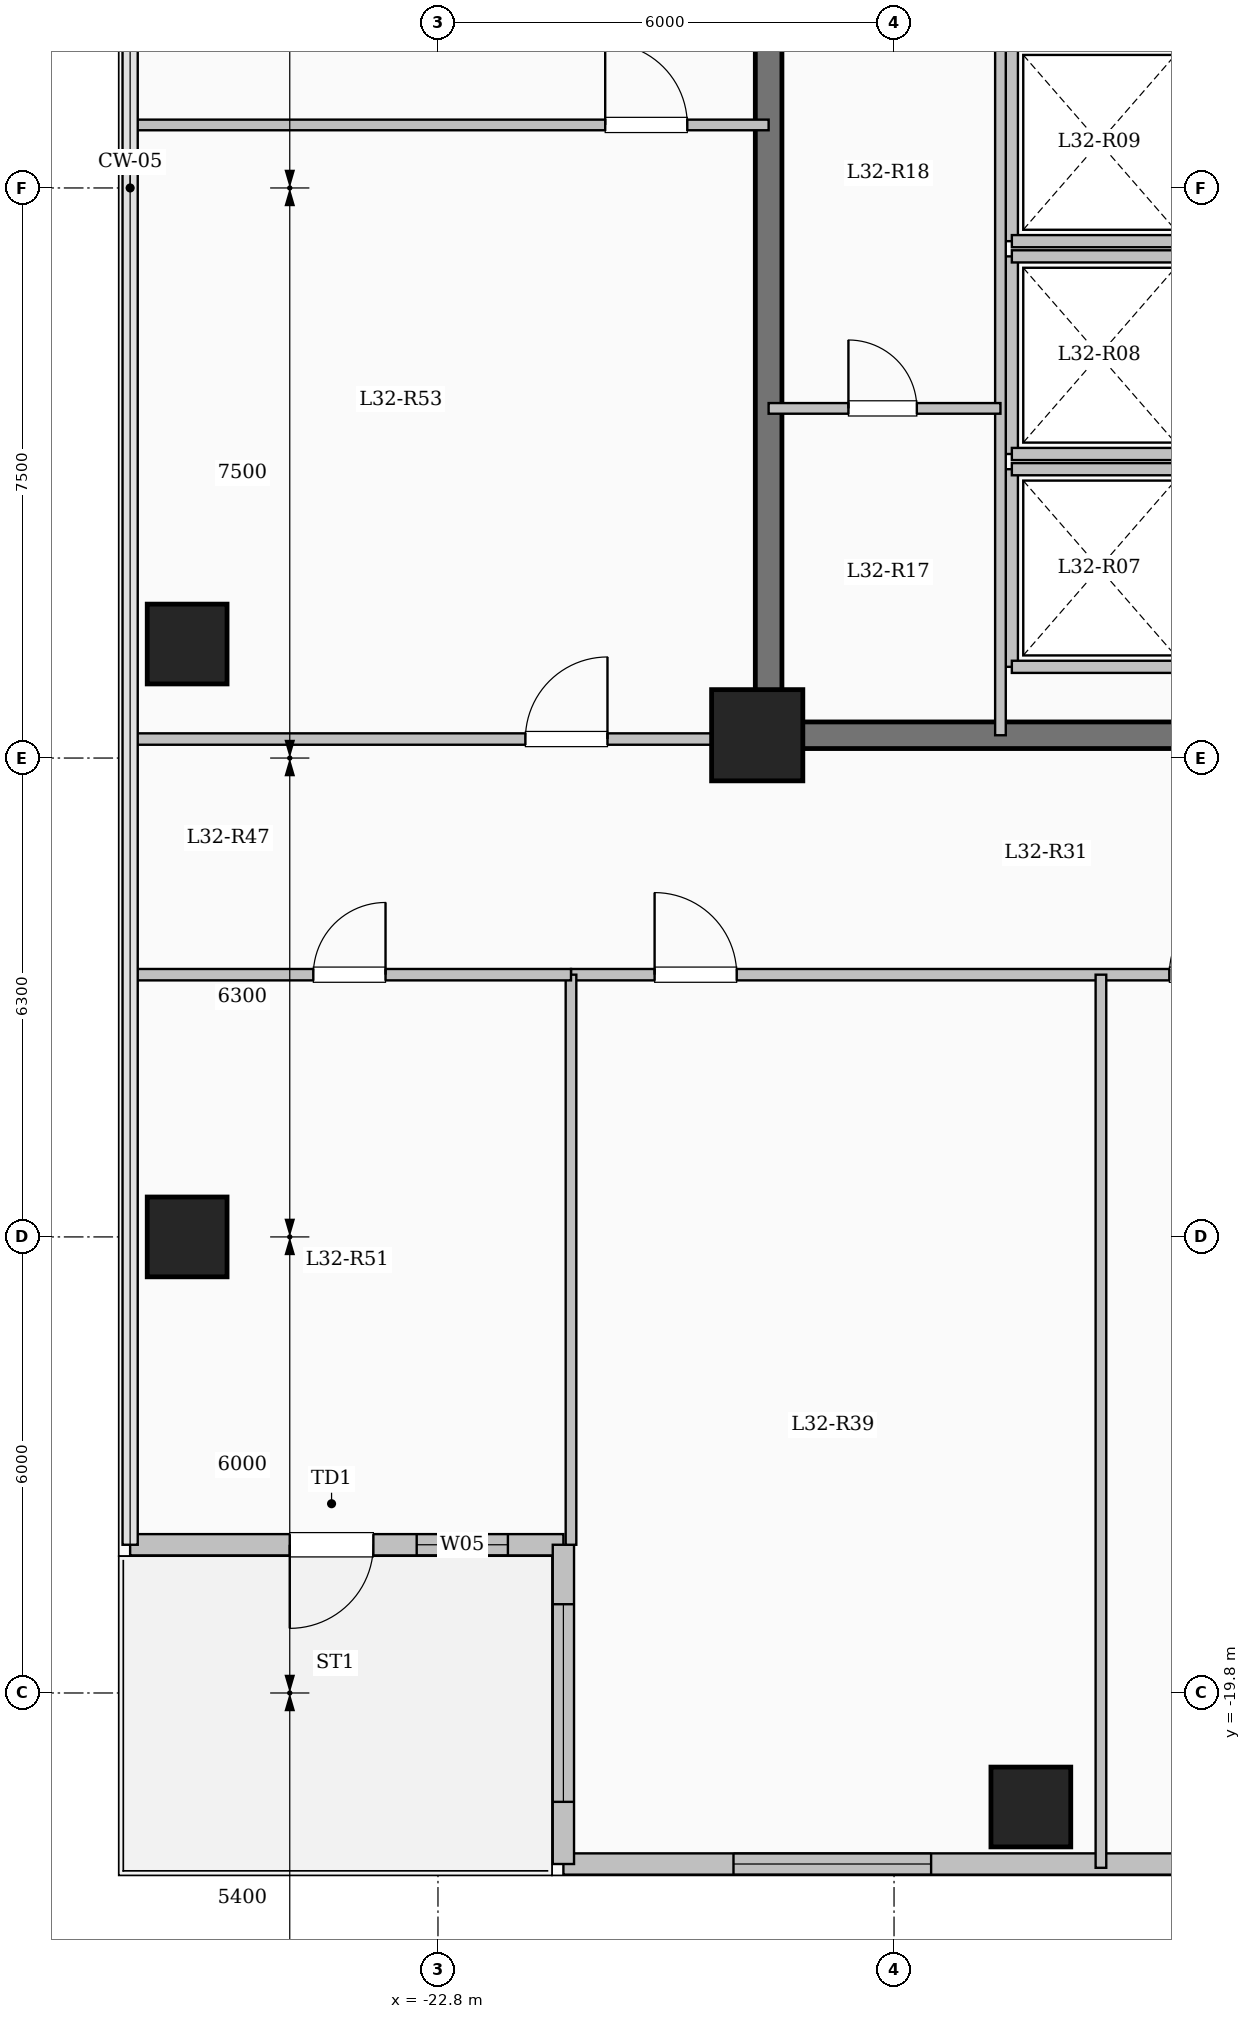
"""IFC4 building model, lengths in metres.
Left out: names, types, materials, properties, quantities, classifications, styles, units other than length and angle.
Written with IfcOpenShell. Run it as: python <this file> out.ifc"""

import sys

from ifc_helpers import new_model, si_unit, direction, frame, frame_2d, origin, origin_2d, place, context, subcontext, project, spatial, rectangle, extrude, element, fill, save


model = new_model("IFC4")
c1 = context("Model", 3, precision=1e-05, world=origin(), true_north=direction((0.0, 1.0)))
c2 = subcontext(c1, "Body", "Model", "MODEL_VIEW")
j1 = project(units=[si_unit("LENGTHUNIT", "METRE"), si_unit("PLANEANGLEUNIT", "RADIAN")], contexts=[c1])
p1 = place(None, origin())
s1 = spatial("IfcSite", under=j1, at=p1, CompositionType="ELEMENT")
p2 = place(p1, origin())
s2 = spatial("IfcBuilding", under=s1, at=p2, CompositionType="ELEMENT")
p3 = place(p2, frame((0.0, 0.0, 118.5)))
s3 = spatial("IfcBuildingStorey", under=s2, at=p3, CompositionType="ELEMENT", Elevation=118.5)
p4 = place(p3, frame((-18.6, -7.2, 0.0), z_axis=(0.0, 0.0, 1.0), x_axis=(1.0, 0.0, 0.0)))
e1 = element("IfcColumn", 1, at=p4, inside=s3, PredefinedType="COLUMN", context=c2, shape_type="SweptSolid", body=[
    extrude(rectangle(XDim=1.2, YDim=1.2, at=origin_2d()), origin(), (0.0, 0.0, 1.0), 4.5),
])
for number, where, z_axis, x_axis in (
    (2, (-15.0, -21.3, 0.0), (0.0, 0.0, 1.0), (1.0, 0.0, 0.0)),
    (3, (-26.1, -13.8, 0.0), (0.0, 0.0, 1.0), (1.0, 0.0, 0.0)),
    (4, (-26.1, -6.0, 0.0), (0.0, 0.0, 1.0), (1.0, 0.0, 0.0)),
):
    element("IfcColumn", number, at=place(p3, frame(where, z_axis=z_axis, x_axis=x_axis)), inside=s3, PredefinedType="COLUMN", context=c2, shape_type="SweptSolid", body=[
        extrude(rectangle(XDim=1.05, YDim=1.05, at=origin_2d()), origin(), (0.0, 0.0, 1.0), 4.5),
    ])
p5 = place(p3, frame((-21.15, -17.85, 0.0), z_axis=(0.0, 0.0, 1.0), x_axis=(-1.0, 0.0, 0.0)))
e5 = element("IfcWall", 5, at=p5, inside=s3, PredefinedType="SOLIDWALL", context=c2, shape_type="SweptSolid", body=[
    extrude(rectangle(XDim=5.7, YDim=0.28, at=frame_2d((2.85, 0.0))), origin(), (0.0, 0.0, 1.0), 4.2),
])
p6 = place(p5, frame((2.5, 0.0, 0.0)))
e6 = element("IfcOpeningElement", 6, at=p6, cuts=e5, PredefinedType="OPENING", context=c2, shape_type="SweptSolid", body=[
    extrude(rectangle(XDim=1.1, YDim=2.2, at=frame_2d((0.55, 1.1))), frame((0.0, 0.15, 0.0), z_axis=(0.0, -1.0, 0.0), x_axis=(1.0, 0.0, 0.0)), (0.0, 0.0, 1.0), 0.3),
])
p7 = place(p5, frame((0.73, 0.0, 0.95)))
e7 = element("IfcOpeningElement", 7, at=p7, cuts=e5, PredefinedType="OPENING", context=c2, shape_type="SweptSolid", body=[
    extrude(rectangle(XDim=1.2, YDim=1.5, at=frame_2d((0.6, 0.75))), frame((0.0, 0.15, 0.0), z_axis=(0.0, -1.0, 0.0), x_axis=(1.0, 0.0, 0.0)), (0.0, 0.0, 1.0), 0.3),
])
p8 = place(p3, frame((-7.35, -22.05, 0.0), z_axis=(0.0, 0.0, 1.0), x_axis=(-1.0, 0.0, 0.0)))
e8 = element("IfcWall", 8, at=p8, inside=s3, PredefinedType="SOLIDWALL", context=c2, shape_type="SweptSolid", body=[
    extrude(rectangle(XDim=13.8, YDim=0.28, at=frame_2d((6.9, 0.0))), origin(), (0.0, 0.0, 1.0), 4.2),
])
p9 = place(p8, frame((0.147, 0.0, 0.95)))
e9 = element("IfcOpeningElement", 9, at=p9, cuts=e8, PredefinedType="OPENING", context=c2, shape_type="SweptSolid", body=[
    extrude(rectangle(XDim=0.85, YDim=1.5, at=frame_2d((0.425, 0.75))), frame((0.0, 0.15, 0.0), z_axis=(0.0, -1.0, 0.0), x_axis=(1.0, 0.0, 0.0)), (0.0, 0.0, 1.0), 0.3),
])
p10 = place(p8, frame((2.664, 0.0, 0.85)))
e10 = element("IfcOpeningElement", 10, at=p10, cuts=e8, PredefinedType="OPENING", context=c2, shape_type="SweptSolid", body=[
    extrude(rectangle(XDim=2.6, YDim=2.4, at=frame_2d((1.3, 1.2))), frame((0.0, 0.15, 0.0), z_axis=(0.0, -1.0, 0.0), x_axis=(1.0, 0.0, 0.0)), (0.0, 0.0, 1.0), 0.3),
])
p11 = place(p8, frame((8.962, 0.0, 0.85)))
e11 = element("IfcOpeningElement", 11, at=p11, cuts=e8, PredefinedType="OPENING", context=c2, shape_type="SweptSolid", body=[
    extrude(rectangle(XDim=2.6, YDim=2.4, at=frame_2d((1.3, 1.2))), frame((0.0, 0.15, 0.0), z_axis=(0.0, -1.0, 0.0), x_axis=(1.0, 0.0, 0.0)), (0.0, 0.0, 1.0), 0.3),
])
p12 = place(p3, frame((-21.15, -22.05, 0.0), z_axis=(0.0, 0.0, 1.0), x_axis=(0.0, 1.0, 0.0)))
e12 = element("IfcWall", 12, at=p12, inside=s3, PredefinedType="SOLIDWALL", context=c2, shape_type="SweptSolid", body=[
    extrude(rectangle(XDim=4.2, YDim=0.28, at=frame_2d((2.1, 0.0))), origin(), (0.0, 0.0, 1.0), 4.2),
])
p13 = place(p12, frame((0.818, 0.0, 0.85)))
e13 = element("IfcOpeningElement", 13, at=p13, cuts=e12, PredefinedType="OPENING", context=c2, shape_type="SweptSolid", body=[
    extrude(rectangle(XDim=2.6, YDim=2.4, at=frame_2d((1.3, 1.2))), frame((0.0, 0.15, 0.0), z_axis=(0.0, -1.0, 0.0), x_axis=(1.0, 0.0, 0.0)), (0.0, 0.0, 1.0), 0.3),
])
p14 = place(p3, frame((-15.25, -6.3, 0.0), z_axis=(0.0, 0.0, 1.0), x_axis=(0.0, 1.0, 0.0)))
e14 = element("IfcWall", 14, at=p14, inside=s3, PredefinedType="SOLIDWALL", context=c2, shape_type="SweptSolid", body=[
    extrude(rectangle(XDim=2.6, YDim=0.16, at=frame_2d((1.3, 0.0))), origin(), (0.0, 0.0, 1.0), 4.2),
])
for number, where, z_axis, x_axis in (
    (15, (-15.25, -6.3, 0.0), (0.0, 0.0, 1.0), (1.0, 0.0, 0.0)),
    (16, (-15.25, -3.7, 0.0), (0.0, 0.0, 1.0), (1.0, 0.0, 0.0)),
):
    element("IfcWall", number, at=place(p3, frame(where, z_axis=z_axis, x_axis=x_axis)), inside=s3, PredefinedType="SOLIDWALL", context=c2, shape_type="SweptSolid", body=[
        extrude(rectangle(XDim=2.3, YDim=0.16, at=frame_2d((1.15, 0.0))), origin(), (0.0, 0.0, 1.0), 4.2),
    ])
p15 = place(p3, frame((-15.25, -3.5, 0.0), z_axis=(0.0, 0.0, 1.0), x_axis=(0.0, 1.0, 0.0)))
e17 = element("IfcWall", 17, at=p15, inside=s3, PredefinedType="SOLIDWALL", context=c2, shape_type="SweptSolid", body=[
    extrude(rectangle(XDim=2.6, YDim=0.16, at=frame_2d((1.3, 0.0))), origin(), (0.0, 0.0, 1.0), 4.2),
])
for number, where, z_axis, x_axis in (
    (18, (-15.25, -3.5, 0.0), (0.0, 0.0, 1.0), (1.0, 0.0, 0.0)),
    (19, (-15.25, -0.9, 0.0), (0.0, 0.0, 1.0), (1.0, 0.0, 0.0)),
):
    element("IfcWall", number, at=place(p3, frame(where, z_axis=z_axis, x_axis=x_axis)), inside=s3, PredefinedType="SOLIDWALL", context=c2, shape_type="SweptSolid", body=[
        extrude(rectangle(XDim=2.3, YDim=0.16, at=frame_2d((1.15, 0.0))), origin(), (0.0, 0.0, 1.0), 4.2),
    ])
p16 = place(p3, frame((-15.25, -0.7, 0.0), z_axis=(0.0, 0.0, 1.0), x_axis=(0.0, 1.0, 0.0)))
e20 = element("IfcWall", 20, at=p16, inside=s3, PredefinedType="SOLIDWALL", context=c2, shape_type="SweptSolid", body=[
    extrude(rectangle(XDim=2.6, YDim=0.16, at=frame_2d((1.3, 0.0))), origin(), (0.0, 0.0, 1.0), 4.2),
])
p17 = place(p3, frame((-15.25, -0.7, 0.0), z_axis=(0.0, 0.0, 1.0), x_axis=(1.0, 0.0, 0.0)))
e21 = element("IfcWall", 21, at=p17, inside=s3, PredefinedType="SOLIDWALL", context=c2, shape_type="SweptSolid", body=[
    extrude(rectangle(XDim=2.3, YDim=0.16, at=frame_2d((1.15, 0.0))), origin(), (0.0, 0.0, 1.0), 4.2),
])
p18 = place(p3, frame((-18.45, -7.375, 0.0), z_axis=(0.0, 0.0, 1.0), x_axis=(0.0, 1.0, 0.0)))
e22 = element("IfcWall", 22, at=p18, inside=s3, PredefinedType="SHEAR", context=c2, shape_type="SweptSolid", body=[
    extrude(rectangle(XDim=14.05, YDim=0.35, at=frame_2d((7.025, 0.0))), origin(), (0.0, 0.0, 1.0), 4.5),
])
p19 = place(p3, frame((-18.625, -7.2, 0.0), z_axis=(0.0, 0.0, 1.0), x_axis=(1.0, 0.0, 0.0)))
e23 = element("IfcWall", 23, at=p19, inside=s3, PredefinedType="SHEAR", context=c2, shape_type="SweptSolid", body=[
    extrude(rectangle(XDim=8.55, YDim=0.35, at=frame_2d((4.275, 0.0))), origin(), (0.0, 0.0, 1.0), 4.5),
])
p20 = place(p3, frame((-15.4, -7.2, 0.0), z_axis=(0.0, 0.0, 1.0), x_axis=(0.0, 1.0, 0.0)))
e24 = element("IfcWall", 24, at=p20, inside=s3, PredefinedType="PARTITIONING", context=c2, shape_type="SweptSolid", body=[
    extrude(rectangle(XDim=10.45, YDim=0.14, at=frame_2d((5.225, 0.0))), origin(), (0.0, 0.0, 1.0), 4.2),
])
p21 = place(p20, frame((9.25, 0.0, 0.0)))
e25 = element("IfcOpeningElement", 25, at=p21, cuts=e24, PredefinedType="OPENING", context=c2, shape_type="SweptSolid", body=[
    extrude(rectangle(XDim=0.9, YDim=2.08, at=frame_2d((0.45, 1.04))), frame((0.0, 0.08, 0.0), z_axis=(0.0, -1.0, 0.0), x_axis=(1.0, 0.0, 0.0)), (0.0, 0.0, 1.0), 0.16),
])
p22 = place(p3, frame((-18.45, -2.9, 0.0), z_axis=(0.0, 0.0, 1.0), x_axis=(1.0, 0.0, 0.0)))
e26 = element("IfcWall", 26, at=p22, inside=s3, PredefinedType="PARTITIONING", context=c2, shape_type="SweptSolid", body=[
    extrude(rectangle(XDim=3.05, YDim=0.14, at=frame_2d((1.525, 0.0))), origin(), (0.0, 0.0, 1.0), 4.2),
])
p23 = place(p22, frame((1.05, 0.0, 0.0)))
e27 = element("IfcOpeningElement", 27, at=p23, cuts=e26, PredefinedType="OPENING", context=c2, shape_type="SweptSolid", body=[
    extrude(rectangle(XDim=0.9, YDim=2.08, at=frame_2d((0.45, 1.04))), frame((0.0, 0.08, 0.0), z_axis=(0.0, -1.0, 0.0), x_axis=(1.0, 0.0, 0.0)), (0.0, 0.0, 1.0), 0.16),
])
p24 = place(p3, frame((-21.05, -10.35, 0.0), z_axis=(0.0, 0.0, 1.0), x_axis=(1.0, 0.0, 0.0)))
e28 = element("IfcWall", 28, at=p24, inside=s3, PredefinedType="PARTITIONING", context=c2, shape_type="SweptSolid", body=[
    extrude(rectangle(XDim=12.5, YDim=0.15, at=frame_2d((6.25, 0.0))), origin(), (0.0, 0.0, 1.0), 4.2),
])
p25 = place(p24, frame((1.1, 0.0, 0.0)))
e29 = element("IfcOpeningElement", 29, at=p25, cuts=e28, PredefinedType="OPENING", context=c2, shape_type="SweptSolid", body=[
    extrude(rectangle(XDim=1.08, YDim=2.15, at=frame_2d((0.54, 1.075))), frame((0.0, 0.085, 0.0), z_axis=(0.0, -1.0, 0.0), x_axis=(1.0, 0.0, 0.0)), (0.0, 0.0, 1.0), 0.17),
])
p26 = place(p24, frame((7.872, 0.0, 0.0)))
e30 = element("IfcOpeningElement", 30, at=p26, cuts=e28, PredefinedType="OPENING", context=c2, shape_type="SweptSolid", body=[
    extrude(rectangle(XDim=1.08, YDim=2.15, at=frame_2d((0.54, 1.075))), frame((0.0, 0.085, 0.0), z_axis=(0.0, -1.0, 0.0), x_axis=(1.0, 0.0, 0.0)), (0.0, 0.0, 1.0), 0.17),
])
p27 = place(p3, frame((-14.078, -22.1, 0.0), z_axis=(0.0, 0.0, 1.0), x_axis=(0.0, 1.0, 0.0)))
e31 = element("IfcWall", 31, at=p27, inside=s3, PredefinedType="PARTITIONING", context=c2, shape_type="SweptSolid", body=[
    extrude(rectangle(XDim=11.75, YDim=0.14, at=frame_2d((5.875, 0.0))), origin(), (0.0, 0.0, 1.0), 4.2),
])
p28 = place(p3, frame((-26.88, -7.25, 0.0), z_axis=(0.0, 0.0, 1.0), x_axis=(1.0, 0.0, 0.0)))
e32 = element("IfcWall", 32, at=p28, inside=s3, PredefinedType="PARTITIONING", context=c2, shape_type="SweptSolid", body=[
    extrude(rectangle(XDim=8.43, YDim=0.15, at=frame_2d((4.215, 0.0))), origin(), (0.0, 0.0, 1.0), 4.2),
])
p29 = place(p28, frame((5.23, 0.0, 0.0)))
e33 = element("IfcOpeningElement", 33, at=p29, cuts=e32, PredefinedType="OPENING", context=c2, shape_type="SweptSolid", body=[
    extrude(rectangle(XDim=1.08, YDim=2.15, at=frame_2d((0.54, 1.075))), frame((0.0, 0.085, 0.0), z_axis=(0.0, -1.0, 0.0), x_axis=(1.0, 0.0, 0.0)), (0.0, 0.0, 1.0), 0.17),
])
p30 = place(p3, frame((-21.05, -17.85, 0.0), z_axis=(0.0, 0.0, 1.0), x_axis=(0.0, 1.0, 0.0)))
e34 = element("IfcWall", 34, at=p30, inside=s3, PredefinedType="PARTITIONING", context=c2, shape_type="SweptSolid", body=[
    extrude(rectangle(XDim=7.5, YDim=0.14, at=frame_2d((3.75, 0.0))), origin(), (0.0, 0.0, 1.0), 4.2),
])
p31 = place(p3, frame((-26.88, -10.35, 0.0), z_axis=(0.0, 0.0, 1.0), x_axis=(1.0, 0.0, 0.0)))
e35 = element("IfcWall", 35, at=p31, inside=s3, PredefinedType="PARTITIONING", context=c2, shape_type="SweptSolid", body=[
    extrude(rectangle(XDim=5.83, YDim=0.15, at=frame_2d((2.915, 0.0))), origin(), (0.0, 0.0, 1.0), 4.2),
])
p32 = place(p31, frame((2.44, 0.0, 0.0)))
e36 = element("IfcOpeningElement", 36, at=p32, cuts=e35, PredefinedType="OPENING", context=c2, shape_type="SweptSolid", body=[
    extrude(rectangle(XDim=0.95, YDim=2.15, at=frame_2d((0.475, 1.075))), frame((0.0, 0.085, 0.0), z_axis=(0.0, -1.0, 0.0), x_axis=(1.0, 0.0, 0.0)), (0.0, 0.0, 1.0), 0.17),
])
p33 = place(p3, frame((-26.88, 0.829, 0.0), z_axis=(0.0, 0.0, 1.0), x_axis=(1.0, 0.0, 0.0)))
e37 = element("IfcWall", 37, at=p33, inside=s3, PredefinedType="PARTITIONING", context=c2, shape_type="SweptSolid", body=[
    extrude(rectangle(XDim=8.43, YDim=0.14, at=frame_2d((4.215, 0.0))), origin(), (0.0, 0.0, 1.0), 4.2),
])
p34 = place(p33, frame((6.28, 0.0, 0.0)))
e38 = element("IfcOpeningElement", 38, at=p34, cuts=e37, PredefinedType="OPENING", context=c2, shape_type="SweptSolid", body=[
    extrude(rectangle(XDim=1.08, YDim=2.15, at=frame_2d((0.54, 1.075))), frame((0.0, 0.08, 0.0), z_axis=(0.0, -1.0, 0.0), x_axis=(1.0, 0.0, 0.0)), (0.0, 0.0, 1.0), 0.16),
])
p35 = place(p6, origin())
e39 = element("IfcDoor", 39, at=p35, inside=s3, OperationType="SINGLE_SWING_RIGHT", PredefinedType="DOOR", context=c2, shape_type="SweptSolid", body=[
    extrude(rectangle(XDim=1.1, YDim=2.2, at=frame_2d((0.55, 1.1))), frame((0.0, 0.025, 0.0), z_axis=(0.0, -1.0, 0.0), x_axis=(1.0, 0.0, 0.0)), (0.0, 0.0, 1.0), 0.05),
])
fill(e6, e39)
p36 = place(p7, origin())
e40 = element("IfcWindow", 40, at=p36, inside=s3, PartitioningType="SINGLE_PANEL", PredefinedType="WINDOW", context=c2, shape_type="SweptSolid", body=[
    extrude(rectangle(XDim=1.2, YDim=1.5, at=frame_2d((0.6, 0.75))), frame((0.0, 0.03, 0.0), z_axis=(0.0, -1.0, 0.0), x_axis=(1.0, 0.0, 0.0)), (0.0, 0.0, 1.0), 0.06),
])
fill(e7, e40)
p37 = place(p11, origin())
e41 = element("IfcWindow", 41, at=p37, inside=s3, PartitioningType="SINGLE_PANEL", PredefinedType="WINDOW", context=c2, shape_type="SweptSolid", body=[
    extrude(rectangle(XDim=2.6, YDim=2.4, at=frame_2d((1.3, 1.2))), frame((0.0, 0.03, 0.0), z_axis=(0.0, -1.0, 0.0), x_axis=(1.0, 0.0, 0.0)), (0.0, 0.0, 1.0), 0.06),
])
fill(e11, e41)
p38 = place(p13, origin())
e42 = element("IfcWindow", 42, at=p38, inside=s3, PartitioningType="SINGLE_PANEL", PredefinedType="WINDOW", context=c2, shape_type="SweptSolid", body=[
    extrude(rectangle(XDim=2.6, YDim=2.4, at=frame_2d((1.3, 1.2))), frame((0.0, 0.03, 0.0), z_axis=(0.0, -1.0, 0.0), x_axis=(1.0, 0.0, 0.0)), (0.0, 0.0, 1.0), 0.06),
])
fill(e13, e42)
p39 = place(p23, origin())
e43 = element("IfcDoor", 43, at=p39, inside=s3, OperationType="SINGLE_SWING_LEFT", PredefinedType="DOOR", context=c2, shape_type="SweptSolid", body=[
    extrude(rectangle(XDim=0.9, YDim=2.08, at=frame_2d((0.45, 1.04))), frame((0.0, 0.025, 0.0), z_axis=(0.0, -1.0, 0.0), x_axis=(1.0, 0.0, 0.0)), (0.0, 0.0, 1.0), 0.05),
])
fill(e27, e43)
p40 = place(p25, origin())
e44 = element("IfcDoor", 44, at=p40, inside=s3, OperationType="SINGLE_SWING_LEFT", PredefinedType="DOOR", context=c2, shape_type="SweptSolid", body=[
    extrude(rectangle(XDim=1.08, YDim=2.15, at=frame_2d((0.54, 1.075))), frame((0.0, 0.025, 0.0), z_axis=(0.0, -1.0, 0.0), x_axis=(1.0, 0.0, 0.0)), (0.0, 0.0, 1.0), 0.05),
])
fill(e29, e44)
p41 = place(p26, origin())
e45 = element("IfcDoor", 45, at=p41, inside=s3, OperationType="SINGLE_SWING_RIGHT", PredefinedType="DOOR", context=c2, shape_type="SweptSolid", body=[
    extrude(rectangle(XDim=1.08, YDim=2.15, at=frame_2d((0.54, 1.075))), frame((0.0, 0.025, 0.0), z_axis=(0.0, -1.0, 0.0), x_axis=(1.0, 0.0, 0.0)), (0.0, 0.0, 1.0), 0.05),
])
fill(e30, e45)
p42 = place(p32, origin())
e46 = element("IfcDoor", 46, at=p42, inside=s3, OperationType="SINGLE_SWING_RIGHT", PredefinedType="DOOR", context=c2, shape_type="SweptSolid", body=[
    extrude(rectangle(XDim=0.95, YDim=2.15, at=frame_2d((0.475, 1.075))), frame((0.0, 0.025, 0.0), z_axis=(0.0, -1.0, 0.0), x_axis=(1.0, 0.0, 0.0)), (0.0, 0.0, 1.0), 0.05),
])
fill(e36, e46)
p43 = place(p29, origin())
e47 = element("IfcDoor", 47, at=p43, inside=s3, OperationType="SINGLE_SWING_RIGHT", PredefinedType="DOOR", context=c2, shape_type="SweptSolid", body=[
    extrude(rectangle(XDim=1.08, YDim=2.15, at=frame_2d((0.54, 1.075))), frame((0.0, 0.025, 0.0), z_axis=(0.0, -1.0, 0.0), x_axis=(1.0, 0.0, 0.0)), (0.0, 0.0, 1.0), 0.05),
])
fill(e33, e47)
p44 = place(p34, origin())
e48 = element("IfcDoor", 48, at=p44, inside=s3, OperationType="SINGLE_SWING_LEFT", PredefinedType="DOOR", context=c2, shape_type="SweptSolid", body=[
    extrude(rectangle(XDim=1.08, YDim=2.15, at=frame_2d((0.54, 1.075))), frame((0.0, 0.025, 0.0), z_axis=(0.0, -1.0, 0.0), x_axis=(1.0, 0.0, 0.0)), (0.0, 0.0, 1.0), 0.05),
])
fill(e38, e48)
save(model, sys.argv[1])
